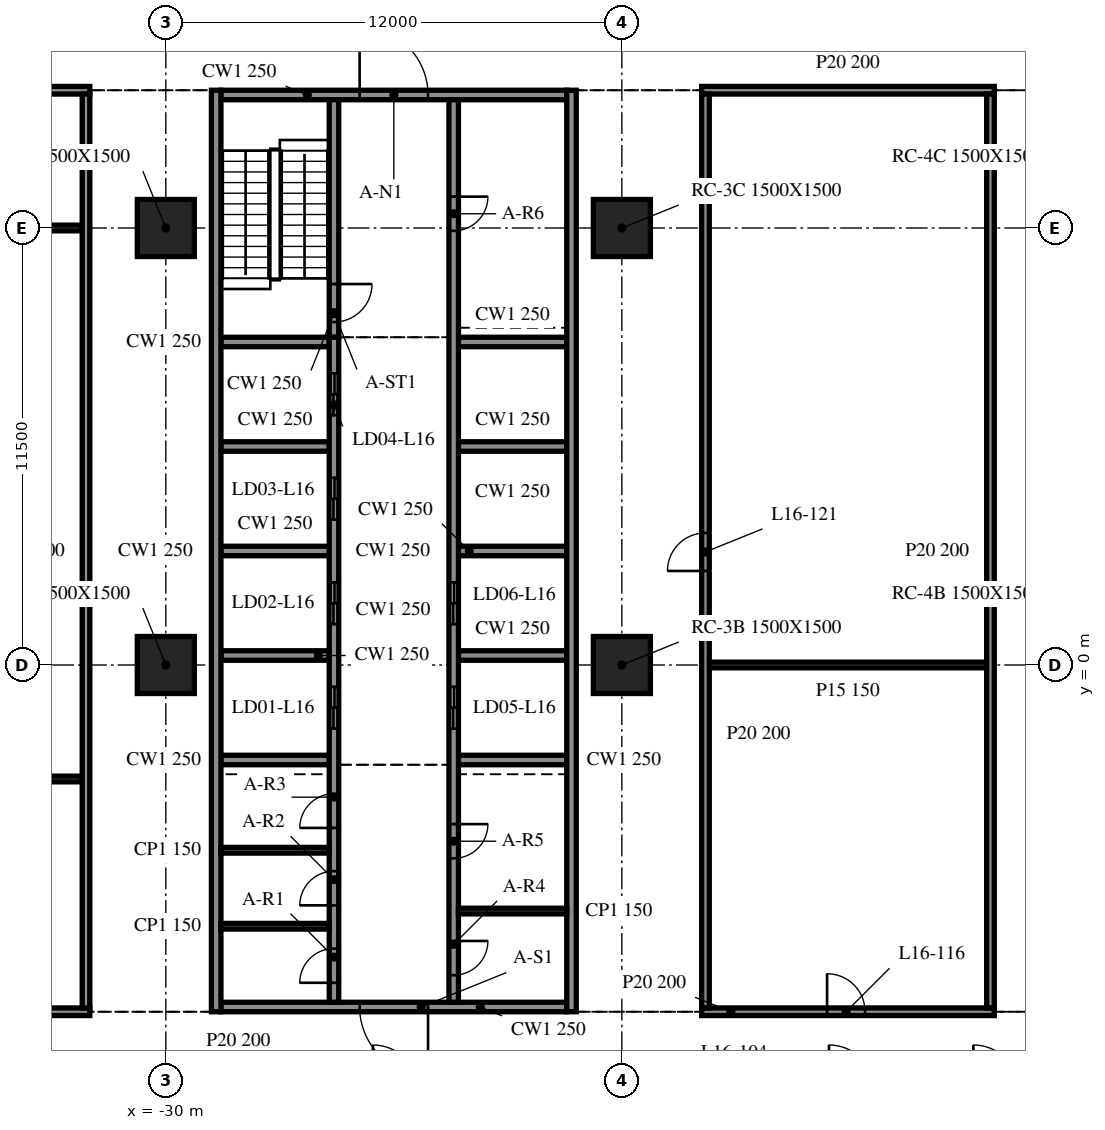
"""IFC4 building model, lengths in metres.
Left out: names, types, materials, properties, quantities, classifications, styles, units other than length and angle.
Written with IfcOpenShell. Run it as: python <this file> out.ifc"""

import sys

from ifc_helpers import new_model, si_unit, direction, frame, frame_2d, origin, origin_2d, place, context, subcontext, project, spatial, rectangle, extrude, element, fill, save


model = new_model("IFC4")
c1 = context("Model", 3, precision=1e-05, world=origin(), true_north=direction((0.0, 1.0)))
c2 = subcontext(c1, "Body", "Model", "MODEL_VIEW")
j1 = project(units=[si_unit("LENGTHUNIT", "METRE"), si_unit("PLANEANGLEUNIT", "RADIAN")], contexts=[c1])
p1 = place(None, origin())
s1 = spatial("IfcSite", under=j1, at=p1, CompositionType="ELEMENT")
p2 = place(p1, origin())
s2 = spatial("IfcBuilding", under=s1, at=p2, CompositionType="ELEMENT")
p3 = place(p2, frame((0.0, 0.0, 71.8)))
s3 = spatial("IfcBuildingStorey", under=s2, at=p3, CompositionType="ELEMENT", Elevation=71.8)
for number, where, z_axis, x_axis in (
    (1, (-30.0, 0.0, -0.34), (0.0, 0.0, 1.0), (1.0, 0.0, 0.0)),
    (2, (-30.0, 11.5, -0.34), (0.0, 0.0, 1.0), (1.0, 0.0, 0.0)),
    (3, (-18.0, 0.0, -0.34), (0.0, 0.0, 1.0), (1.0, 0.0, 0.0)),
    (4, (-18.0, 11.5, -0.34), (0.0, 0.0, 1.0), (1.0, 0.0, 0.0)),
):
    element("IfcColumn", number, at=place(p3, frame(where, z_axis=z_axis, x_axis=x_axis)), inside=s3, PredefinedType="COLUMN", context=c2, shape_type="SweptSolid", body=[
        extrude(rectangle(XDim=1.5, YDim=1.5, at=origin_2d()), origin(), (0.0, 0.0, 1.0), 4.3),
    ])
for number, where, z_axis, x_axis in (
    (5, (-28.675, 15.125, 0.0), (0.0, 0.0, 1.0), (0.0, -1.0, 0.0)),
    (6, (-19.325, -9.125, 0.0), (0.0, 0.0, 1.0), (0.0, 1.0, 0.0)),
):
    element("IfcWall", number, at=place(p3, frame(where, z_axis=z_axis, x_axis=x_axis)), inside=s3, PredefinedType="SOLIDWALL", context=c2, shape_type="SweptSolid", body=[
        extrude(rectangle(XDim=24.25, YDim=0.25, at=frame_2d((12.125, 0.0))), origin(), (0.0, 0.0, 1.0), 3.96),
    ])
p4 = place(p3, frame((-19.45, -9.0, 0.0), z_axis=(0.0, 0.0, 1.0), x_axis=(-1.0, 0.0, 0.0)))
e7 = element("IfcWall", 7, at=p4, inside=s3, PredefinedType="SOLIDWALL", context=c2, shape_type="SweptSolid", body=[
    extrude(rectangle(XDim=9.1, YDim=0.25, at=frame_2d((4.55, 0.0))), origin(), (0.0, 0.0, 1.0), 3.96),
])
p5 = place(p4, frame((3.65, 0.0, 0.0)))
e8 = element("IfcOpeningElement", 8, at=p5, cuts=e7, PredefinedType="OPENING", context=c2, shape_type="SweptSolid", body=[
    extrude(rectangle(XDim=1.8, YDim=2.1, at=frame_2d((0.9, 1.05))), frame((0.0, 0.135, 0.0), z_axis=(0.0, -1.0, 0.0), x_axis=(1.0, 0.0, 0.0)), (0.0, 0.0, 1.0), 0.27),
])
p6 = place(p3, frame((-28.55, 15.0, 0.0), z_axis=(0.0, 0.0, 1.0), x_axis=(1.0, 0.0, 0.0)))
e9 = element("IfcWall", 9, at=p6, inside=s3, PredefinedType="SOLIDWALL", context=c2, shape_type="SweptSolid", body=[
    extrude(rectangle(XDim=9.1, YDim=0.25, at=frame_2d((4.55, 0.0))), origin(), (0.0, 0.0, 1.0), 3.96),
])
p7 = place(p6, frame((3.65, 0.0, 0.0)))
e10 = element("IfcOpeningElement", 10, at=p7, cuts=e9, PredefinedType="OPENING", context=c2, shape_type="SweptSolid", body=[
    extrude(rectangle(XDim=1.8, YDim=2.1, at=frame_2d((0.9, 1.05))), frame((0.0, 0.135, 0.0), z_axis=(0.0, -1.0, 0.0), x_axis=(1.0, 0.0, 0.0)), (0.0, 0.0, 1.0), 0.27),
])
p8 = place(p3, frame((-25.575, -8.875, 0.0), z_axis=(0.0, 0.0, 1.0), x_axis=(0.0, 1.0, 0.0)))
e11 = element("IfcWall", 11, at=p8, inside=s3, PredefinedType="SOLIDWALL", context=c2, shape_type="SweptSolid", body=[
    extrude(rectangle(XDim=17.5, YDim=0.25, at=frame_2d((8.75, 0.0))), origin(), (0.0, 0.0, 1.0), 3.96),
])
p9 = place(p8, frame((7.2, 0.0, 0.0)))
e12 = element("IfcOpeningElement", 12, at=p9, cuts=e11, PredefinedType="OPENING", context=c2, shape_type="SweptSolid", body=[
    extrude(rectangle(XDim=1.1, YDim=2.1, at=frame_2d((0.55, 1.05))), frame((0.0, 0.135, 0.0), z_axis=(0.0, -1.0, 0.0), x_axis=(1.0, 0.0, 0.0)), (0.0, 0.0, 1.0), 0.27),
])
p10 = place(p8, frame((9.95, 0.0, 0.0)))
e13 = element("IfcOpeningElement", 13, at=p10, cuts=e11, PredefinedType="OPENING", context=c2, shape_type="SweptSolid", body=[
    extrude(rectangle(XDim=1.1, YDim=2.1, at=frame_2d((0.55, 1.05))), frame((0.0, 0.135, 0.0), z_axis=(0.0, -1.0, 0.0), x_axis=(1.0, 0.0, 0.0)), (0.0, 0.0, 1.0), 0.27),
])
p11 = place(p8, frame((12.7, 0.0, 0.0)))
e14 = element("IfcOpeningElement", 14, at=p11, cuts=e11, PredefinedType="OPENING", context=c2, shape_type="SweptSolid", body=[
    extrude(rectangle(XDim=1.1, YDim=2.1, at=frame_2d((0.55, 1.05))), frame((0.0, 0.135, 0.0), z_axis=(0.0, -1.0, 0.0), x_axis=(1.0, 0.0, 0.0)), (0.0, 0.0, 1.0), 0.27),
])
p12 = place(p8, frame((15.45, 0.0, 0.0)))
e15 = element("IfcOpeningElement", 15, at=p12, cuts=e11, PredefinedType="OPENING", context=c2, shape_type="SweptSolid", body=[
    extrude(rectangle(XDim=1.1, YDim=2.1, at=frame_2d((0.55, 1.05))), frame((0.0, 0.135, 0.0), z_axis=(0.0, -1.0, 0.0), x_axis=(1.0, 0.0, 0.0)), (0.0, 0.0, 1.0), 0.27),
])
p13 = place(p8, frame((0.512, 0.0, 0.0)))
e16 = element("IfcOpeningElement", 16, at=p13, cuts=e11, PredefinedType="OPENING", context=c2, shape_type="SweptSolid", body=[
    extrude(rectangle(XDim=0.9, YDim=2.1, at=frame_2d((0.45, 1.05))), frame((0.0, 0.135, 0.0), z_axis=(0.0, -1.0, 0.0), x_axis=(1.0, 0.0, 0.0)), (0.0, 0.0, 1.0), 0.27),
])
p14 = place(p8, frame((2.55, 0.0, 0.0)))
e17 = element("IfcOpeningElement", 17, at=p14, cuts=e11, PredefinedType="OPENING", context=c2, shape_type="SweptSolid", body=[
    extrude(rectangle(XDim=0.9, YDim=2.1, at=frame_2d((0.45, 1.05))), frame((0.0, 0.135, 0.0), z_axis=(0.0, -1.0, 0.0), x_axis=(1.0, 0.0, 0.0)), (0.0, 0.0, 1.0), 0.27),
])
p15 = place(p8, frame((4.587, 0.0, 0.0)))
e18 = element("IfcOpeningElement", 18, at=p15, cuts=e11, PredefinedType="OPENING", context=c2, shape_type="SweptSolid", body=[
    extrude(rectangle(XDim=0.9, YDim=2.1, at=frame_2d((0.45, 1.05))), frame((0.0, 0.135, 0.0), z_axis=(0.0, -1.0, 0.0), x_axis=(1.0, 0.0, 0.0)), (0.0, 0.0, 1.0), 0.27),
])
p16 = place(p3, frame((-25.575, 14.875, 0.0), z_axis=(0.0, 0.0, 1.0), x_axis=(0.0, -1.0, 0.0)))
e19 = element("IfcWall", 19, at=p16, inside=s3, PredefinedType="SOLIDWALL", context=c2, shape_type="SweptSolid", body=[
    extrude(rectangle(XDim=6.25, YDim=0.25, at=frame_2d((3.125, 0.0))), origin(), (0.0, 0.0, 1.0), 3.96),
])
p17 = place(p16, frame((4.85, 0.0, 0.0)))
e20 = element("IfcOpeningElement", 20, at=p17, cuts=e19, PredefinedType="OPENING", context=c2, shape_type="SweptSolid", body=[
    extrude(rectangle(XDim=1.0, YDim=2.1, at=frame_2d((0.5, 1.05))), frame((0.0, 0.135, 0.0), z_axis=(0.0, -1.0, 0.0), x_axis=(1.0, 0.0, 0.0)), (0.0, 0.0, 1.0), 0.27),
])
p18 = place(p3, frame((-22.425, 14.875, 0.0), z_axis=(0.0, 0.0, 1.0), x_axis=(0.0, -1.0, 0.0)))
e21 = element("IfcWall", 21, at=p18, inside=s3, PredefinedType="SOLIDWALL", context=c2, shape_type="SweptSolid", body=[
    extrude(rectangle(XDim=23.75, YDim=0.25, at=frame_2d((11.875, 0.0))), origin(), (0.0, 0.0, 1.0), 3.96),
])
p19 = place(p18, frame((15.45, 0.0, 0.0)))
e22 = element("IfcOpeningElement", 22, at=p19, cuts=e21, PredefinedType="OPENING", context=c2, shape_type="SweptSolid", body=[
    extrude(rectangle(XDim=1.1, YDim=2.1, at=frame_2d((0.55, 1.05))), frame((0.0, 0.135, 0.0), z_axis=(0.0, -1.0, 0.0), x_axis=(1.0, 0.0, 0.0)), (0.0, 0.0, 1.0), 0.27),
])
p20 = place(p18, frame((12.7, 0.0, 0.0)))
e23 = element("IfcOpeningElement", 23, at=p20, cuts=e21, PredefinedType="OPENING", context=c2, shape_type="SweptSolid", body=[
    extrude(rectangle(XDim=1.1, YDim=2.1, at=frame_2d((0.55, 1.05))), frame((0.0, 0.135, 0.0), z_axis=(0.0, -1.0, 0.0), x_axis=(1.0, 0.0, 0.0)), (0.0, 0.0, 1.0), 0.27),
])
p21 = place(p18, frame((22.137, 0.0, 0.0)))
e24 = element("IfcOpeningElement", 24, at=p21, cuts=e21, PredefinedType="OPENING", context=c2, shape_type="SweptSolid", body=[
    extrude(rectangle(XDim=0.9, YDim=2.1, at=frame_2d((0.45, 1.05))), frame((0.0, 0.135, 0.0), z_axis=(0.0, -1.0, 0.0), x_axis=(1.0, 0.0, 0.0)), (0.0, 0.0, 1.0), 0.27),
])
p22 = place(p18, frame((19.062, 0.0, 0.0)))
e25 = element("IfcOpeningElement", 25, at=p22, cuts=e21, PredefinedType="OPENING", context=c2, shape_type="SweptSolid", body=[
    extrude(rectangle(XDim=0.9, YDim=2.1, at=frame_2d((0.45, 1.05))), frame((0.0, 0.135, 0.0), z_axis=(0.0, -1.0, 0.0), x_axis=(1.0, 0.0, 0.0)), (0.0, 0.0, 1.0), 0.27),
])
p23 = place(p18, frame((2.55, 0.0, 0.0)))
e26 = element("IfcOpeningElement", 26, at=p23, cuts=e21, PredefinedType="OPENING", context=c2, shape_type="SweptSolid", body=[
    extrude(rectangle(XDim=0.9, YDim=2.1, at=frame_2d((0.45, 1.05))), frame((0.0, 0.135, 0.0), z_axis=(0.0, -1.0, 0.0), x_axis=(1.0, 0.0, 0.0)), (0.0, 0.0, 1.0), 0.27),
])
for number, where, z_axis, x_axis in (
    (27, (-28.55, -2.5, 0.0), (0.0, 0.0, 1.0), (1.0, 0.0, 0.0)),
    (28, (-28.55, 0.25, 0.0), (0.0, 0.0, 1.0), (1.0, 0.0, 0.0)),
    (29, (-28.55, 3.0, 0.0), (0.0, 0.0, 1.0), (1.0, 0.0, 0.0)),
    (30, (-28.55, 5.75, 0.0), (0.0, 0.0, 1.0), (1.0, 0.0, 0.0)),
    (31, (-28.55, 8.5, 0.0), (0.0, 0.0, 1.0), (1.0, 0.0, 0.0)),
    (32, (-22.3, -2.5, 0.0), (0.0, 0.0, 1.0), (1.0, 0.0, 0.0)),
    (33, (-22.3, 0.25, 0.0), (0.0, 0.0, 1.0), (1.0, 0.0, 0.0)),
    (34, (-22.3, 3.0, 0.0), (0.0, 0.0, 1.0), (1.0, 0.0, 0.0)),
    (35, (-22.3, 5.75, 0.0), (0.0, 0.0, 1.0), (1.0, 0.0, 0.0)),
    (36, (-22.3, 8.5, 0.0), (0.0, 0.0, 1.0), (1.0, 0.0, 0.0)),
):
    element("IfcWall", number, at=place(p3, frame(where, z_axis=z_axis, x_axis=x_axis)), inside=s3, PredefinedType="SOLIDWALL", context=c2, shape_type="SweptSolid", body=[
        extrude(rectangle(XDim=2.85, YDim=0.25, at=frame_2d((1.425, 0.0))), origin(), (0.0, 0.0, 1.0), 3.96),
    ])
for number, where, z_axis, x_axis in (
    (37, (-28.55, -6.875, 0.0), (0.0, 0.0, 1.0), (1.0, 0.0, 0.0)),
    (38, (-28.55, -4.875, 0.0), (0.0, 0.0, 1.0), (1.0, 0.0, 0.0)),
    (39, (-22.3, -6.475, 0.0), (0.0, 0.0, 1.0), (1.0, 0.0, 0.0)),
):
    element("IfcWall", number, at=place(p3, frame(where, z_axis=z_axis, x_axis=x_axis)), inside=s3, PredefinedType="PARTITIONING", context=c2, shape_type="SweptSolid", body=[
        extrude(rectangle(XDim=2.85, YDim=0.15, at=frame_2d((1.425, 0.0))), origin(), (0.0, 0.0, 1.0), 3.96),
    ])
p24 = place(p3, frame((-39.95, -9.125, 0.0), z_axis=(0.0, 0.0, 1.0), x_axis=(1.0, 0.0, 0.0)))
e40 = element("IfcWall", 40, at=p24, inside=s3, PredefinedType="PARTITIONING", context=c2, shape_type="SweptSolid", body=[
    extrude(rectangle(XDim=7.95, YDim=0.2, at=frame_2d((3.975, 0.0))), origin(), (0.0, 0.0, 1.0), 3.96),
])
p25 = place(p24, frame((3.3, 0.0, 0.0)))
e41 = element("IfcOpeningElement", 41, at=p25, cuts=e40, PredefinedType="OPENING", context=c2, shape_type="SweptSolid", body=[
    extrude(rectangle(XDim=1.2, YDim=2.1, at=frame_2d((0.6, 1.05))), frame((0.0, 0.11, 0.0), z_axis=(0.0, -1.0, 0.0), x_axis=(1.0, 0.0, 0.0)), (0.0, 0.0, 1.0), 0.22),
])
p26 = place(p3, frame((-15.9, -9.125, 0.0), z_axis=(0.0, 0.0, 1.0), x_axis=(1.0, 0.0, 0.0)))
e42 = element("IfcWall", 42, at=p26, inside=s3, PredefinedType="PARTITIONING", context=c2, shape_type="SweptSolid", body=[
    extrude(rectangle(XDim=7.7, YDim=0.2, at=frame_2d((3.85, 0.0))), origin(), (0.0, 0.0, 1.0), 3.96),
])
p27 = place(p26, frame((3.3, 0.0, 0.0)))
e43 = element("IfcOpeningElement", 43, at=p27, cuts=e42, PredefinedType="OPENING", context=c2, shape_type="SweptSolid", body=[
    extrude(rectangle(XDim=1.0, YDim=2.1, at=frame_2d((0.5, 1.05))), frame((0.0, 0.11, 0.0), z_axis=(0.0, -1.0, 0.0), x_axis=(1.0, 0.0, 0.0)), (0.0, 0.0, 1.0), 0.22),
])
p28 = place(p3, frame((-39.75, -3.0, 0.0), z_axis=(0.0, 0.0, 1.0), x_axis=(1.0, 0.0, 0.0)))
e44 = element("IfcWall", 44, at=p28, inside=s3, PredefinedType="PARTITIONING", context=c2, shape_type="SweptSolid", body=[
    extrude(rectangle(XDim=7.55, YDim=0.15, at=frame_2d((3.775, 0.0))), origin(), (0.0, 0.0, 1.0), 3.96),
])
p29 = place(p3, frame((-15.7, 0.0, 0.0), z_axis=(0.0, 0.0, 1.0), x_axis=(1.0, 0.0, 0.0)))
e45 = element("IfcWall", 45, at=p29, inside=s3, PredefinedType="PARTITIONING", context=c2, shape_type="SweptSolid", body=[
    extrude(rectangle(XDim=7.3, YDim=0.15, at=frame_2d((3.65, 0.0))), origin(), (0.0, 0.0, 1.0), 3.96),
])
p30 = place(p3, frame((-39.75, 11.5, 0.0), z_axis=(0.0, 0.0, 1.0), x_axis=(1.0, 0.0, 0.0)))
e46 = element("IfcWall", 46, at=p30, inside=s3, PredefinedType="PARTITIONING", context=c2, shape_type="SweptSolid", body=[
    extrude(rectangle(XDim=7.55, YDim=0.15, at=frame_2d((3.775, 0.0))), origin(), (0.0, 0.0, 1.0), 3.96),
])
p31 = place(p3, frame((-39.95, 15.125, 0.0), z_axis=(0.0, 0.0, 1.0), x_axis=(1.0, 0.0, 0.0)))
e47 = element("IfcWall", 47, at=p31, inside=s3, PredefinedType="PARTITIONING", context=c2, shape_type="SweptSolid", body=[
    extrude(rectangle(XDim=7.95, YDim=0.2, at=frame_2d((3.975, 0.0))), origin(), (0.0, 0.0, 1.0), 3.96),
])
p32 = place(p31, frame((3.5, 0.0, 0.0)))
e48 = element("IfcOpeningElement", 48, at=p32, cuts=e47, PredefinedType="OPENING", context=c2, shape_type="SweptSolid", body=[
    extrude(rectangle(XDim=1.0, YDim=2.1, at=frame_2d((0.5, 1.05))), frame((0.0, 0.11, 0.0), z_axis=(0.0, -1.0, 0.0), x_axis=(1.0, 0.0, 0.0)), (0.0, 0.0, 1.0), 0.22),
])
p33 = place(p3, frame((-15.9, 15.125, 0.0), z_axis=(0.0, 0.0, 1.0), x_axis=(1.0, 0.0, 0.0)))
e49 = element("IfcWall", 49, at=p33, inside=s3, PredefinedType="PARTITIONING", context=c2, shape_type="SweptSolid", body=[
    extrude(rectangle(XDim=7.7, YDim=0.2, at=frame_2d((3.85, 0.0))), origin(), (0.0, 0.0, 1.0), 3.96),
])
p34 = place(p3, frame((-32.1, -9.025, 0.0), z_axis=(0.0, 0.0, 1.0), x_axis=(0.0, 1.0, 0.0)))
e50 = element("IfcWall", 50, at=p34, inside=s3, PredefinedType="PARTITIONING", context=c2, shape_type="SweptSolid", body=[
    extrude(rectangle(XDim=24.05, YDim=0.2, at=frame_2d((12.025, 0.0))), origin(), (0.0, 0.0, 1.0), 3.96),
])
p35 = place(p3, frame((-15.8, -9.025, 0.0), z_axis=(0.0, 0.0, 1.0), x_axis=(0.0, 1.0, 0.0)))
e51 = element("IfcWall", 51, at=p35, inside=s3, PredefinedType="PARTITIONING", context=c2, shape_type="SweptSolid", body=[
    extrude(rectangle(XDim=24.05, YDim=0.2, at=frame_2d((12.025, 0.0))), origin(), (0.0, 0.0, 1.0), 3.96),
])
p36 = place(p35, frame((11.5, 0.0, 0.0)))
e52 = element("IfcOpeningElement", 52, at=p36, cuts=e51, PredefinedType="OPENING", context=c2, shape_type="SweptSolid", body=[
    extrude(rectangle(XDim=1.0, YDim=2.1, at=frame_2d((0.5, 1.05))), frame((0.0, 0.11, 0.0), z_axis=(0.0, -1.0, 0.0), x_axis=(1.0, 0.0, 0.0)), (0.0, 0.0, 1.0), 0.22),
])
p37 = place(p3, frame((-8.3, -9.025, 0.0), z_axis=(0.0, 0.0, 1.0), x_axis=(0.0, 1.0, 0.0)))
e53 = element("IfcWall", 53, at=p37, inside=s3, PredefinedType="PARTITIONING", context=c2, shape_type="SweptSolid", body=[
    extrude(rectangle(XDim=24.05, YDim=0.2, at=frame_2d((12.025, 0.0))), origin(), (0.0, 0.0, 1.0), 3.96),
])
p38 = place(p5, origin())
e54 = element("IfcDoor", 54, at=p38, inside=s3, OperationType="DOUBLE_DOOR_SINGLE_SWING", PredefinedType="DOOR", context=c2, shape_type="SweptSolid", body=[
    extrude(rectangle(XDim=1.8, YDim=2.1, at=frame_2d((0.9, 1.05))), frame((0.0, 0.025, 0.0), z_axis=(0.0, -1.0, 0.0), x_axis=(1.0, 0.0, 0.0)), (0.0, 0.0, 1.0), 0.05),
])
fill(e8, e54)
p39 = place(p7, origin())
e55 = element("IfcDoor", 55, at=p39, inside=s3, OperationType="DOUBLE_DOOR_SINGLE_SWING", PredefinedType="DOOR", context=c2, shape_type="SweptSolid", body=[
    extrude(rectangle(XDim=1.8, YDim=2.1, at=frame_2d((0.9, 1.05))), frame((0.0, 0.025, 0.0), z_axis=(0.0, -1.0, 0.0), x_axis=(1.0, 0.0, 0.0)), (0.0, 0.0, 1.0), 0.05),
])
fill(e10, e55)
p40 = place(p19, origin())
e56 = element("IfcDoor", 56, at=p40, inside=s3, OperationType="DOUBLE_DOOR_SLIDING", PredefinedType="DOOR", context=c2, shape_type="SweptSolid", body=[
    extrude(rectangle(XDim=1.1, YDim=2.1, at=frame_2d((0.55, 1.05))), frame((0.0, 0.025, 0.0), z_axis=(0.0, -1.0, 0.0), x_axis=(1.0, 0.0, 0.0)), (0.0, 0.0, 1.0), 0.05),
])
fill(e22, e56)
p41 = place(p20, origin())
e57 = element("IfcDoor", 57, at=p41, inside=s3, OperationType="DOUBLE_DOOR_SLIDING", PredefinedType="DOOR", context=c2, shape_type="SweptSolid", body=[
    extrude(rectangle(XDim=1.1, YDim=2.1, at=frame_2d((0.55, 1.05))), frame((0.0, 0.025, 0.0), z_axis=(0.0, -1.0, 0.0), x_axis=(1.0, 0.0, 0.0)), (0.0, 0.0, 1.0), 0.05),
])
fill(e23, e57)
p42 = place(p9, origin())
e58 = element("IfcDoor", 58, at=p42, inside=s3, OperationType="DOUBLE_DOOR_SLIDING", PredefinedType="DOOR", context=c2, shape_type="SweptSolid", body=[
    extrude(rectangle(XDim=1.1, YDim=2.1, at=frame_2d((0.55, 1.05))), frame((0.0, 0.025, 0.0), z_axis=(0.0, -1.0, 0.0), x_axis=(1.0, 0.0, 0.0)), (0.0, 0.0, 1.0), 0.05),
])
fill(e12, e58)
p43 = place(p10, origin())
e59 = element("IfcDoor", 59, at=p43, inside=s3, OperationType="DOUBLE_DOOR_SLIDING", PredefinedType="DOOR", context=c2, shape_type="SweptSolid", body=[
    extrude(rectangle(XDim=1.1, YDim=2.1, at=frame_2d((0.55, 1.05))), frame((0.0, 0.025, 0.0), z_axis=(0.0, -1.0, 0.0), x_axis=(1.0, 0.0, 0.0)), (0.0, 0.0, 1.0), 0.05),
])
fill(e13, e59)
p44 = place(p11, origin())
e60 = element("IfcDoor", 60, at=p44, inside=s3, OperationType="DOUBLE_DOOR_SLIDING", PredefinedType="DOOR", context=c2, shape_type="SweptSolid", body=[
    extrude(rectangle(XDim=1.1, YDim=2.1, at=frame_2d((0.55, 1.05))), frame((0.0, 0.025, 0.0), z_axis=(0.0, -1.0, 0.0), x_axis=(1.0, 0.0, 0.0)), (0.0, 0.0, 1.0), 0.05),
])
fill(e14, e60)
p45 = place(p12, origin())
e61 = element("IfcDoor", 61, at=p45, inside=s3, OperationType="DOUBLE_DOOR_SLIDING", PredefinedType="DOOR", context=c2, shape_type="SweptSolid", body=[
    extrude(rectangle(XDim=1.1, YDim=2.1, at=frame_2d((0.55, 1.05))), frame((0.0, 0.025, 0.0), z_axis=(0.0, -1.0, 0.0), x_axis=(1.0, 0.0, 0.0)), (0.0, 0.0, 1.0), 0.05),
])
fill(e15, e61)
p46 = place(p13, origin())
e62 = element("IfcDoor", 62, at=p46, inside=s3, OperationType="SINGLE_SWING_LEFT", PredefinedType="DOOR", context=c2, shape_type="SweptSolid", body=[
    extrude(rectangle(XDim=0.9, YDim=2.1, at=frame_2d((0.45, 1.05))), frame((0.0, 0.025, 0.0), z_axis=(0.0, -1.0, 0.0), x_axis=(1.0, 0.0, 0.0)), (0.0, 0.0, 1.0), 0.05),
])
fill(e16, e62)
p47 = place(p14, origin())
e63 = element("IfcDoor", 63, at=p47, inside=s3, OperationType="SINGLE_SWING_RIGHT", PredefinedType="DOOR", context=c2, shape_type="SweptSolid", body=[
    extrude(rectangle(XDim=0.9, YDim=2.1, at=frame_2d((0.45, 1.05))), frame((0.0, 0.025, 0.0), z_axis=(0.0, -1.0, 0.0), x_axis=(1.0, 0.0, 0.0)), (0.0, 0.0, 1.0), 0.05),
])
fill(e17, e63)
p48 = place(p15, origin())
e64 = element("IfcDoor", 64, at=p48, inside=s3, OperationType="SINGLE_SWING_LEFT", PredefinedType="DOOR", context=c2, shape_type="SweptSolid", body=[
    extrude(rectangle(XDim=0.9, YDim=2.1, at=frame_2d((0.45, 1.05))), frame((0.0, 0.025, 0.0), z_axis=(0.0, -1.0, 0.0), x_axis=(1.0, 0.0, 0.0)), (0.0, 0.0, 1.0), 0.05),
])
fill(e18, e64)
p49 = place(p21, origin())
e65 = element("IfcDoor", 65, at=p49, inside=s3, OperationType="SINGLE_SWING_RIGHT", PredefinedType="DOOR", context=c2, shape_type="SweptSolid", body=[
    extrude(rectangle(XDim=0.9, YDim=2.1, at=frame_2d((0.45, 1.05))), frame((0.0, 0.025, 0.0), z_axis=(0.0, -1.0, 0.0), x_axis=(1.0, 0.0, 0.0)), (0.0, 0.0, 1.0), 0.05),
])
fill(e24, e65)
p50 = place(p22, origin())
e66 = element("IfcDoor", 66, at=p50, inside=s3, OperationType="SINGLE_SWING_LEFT", PredefinedType="DOOR", context=c2, shape_type="SweptSolid", body=[
    extrude(rectangle(XDim=0.9, YDim=2.1, at=frame_2d((0.45, 1.05))), frame((0.0, 0.025, 0.0), z_axis=(0.0, -1.0, 0.0), x_axis=(1.0, 0.0, 0.0)), (0.0, 0.0, 1.0), 0.05),
])
fill(e25, e66)
p51 = place(p23, origin())
e67 = element("IfcDoor", 67, at=p51, inside=s3, OperationType="SINGLE_SWING_RIGHT", PredefinedType="DOOR", context=c2, shape_type="SweptSolid", body=[
    extrude(rectangle(XDim=0.9, YDim=2.1, at=frame_2d((0.45, 1.05))), frame((0.0, 0.025, 0.0), z_axis=(0.0, -1.0, 0.0), x_axis=(1.0, 0.0, 0.0)), (0.0, 0.0, 1.0), 0.05),
])
fill(e26, e67)
p52 = place(p17, origin())
e68 = element("IfcDoor", 68, at=p52, inside=s3, OperationType="SINGLE_SWING_LEFT", PredefinedType="DOOR", context=c2, shape_type="SweptSolid", body=[
    extrude(rectangle(XDim=1.0, YDim=2.1, at=frame_2d((0.5, 1.05))), frame((0.0, 0.025, 0.0), z_axis=(0.0, -1.0, 0.0), x_axis=(1.0, 0.0, 0.0)), (0.0, 0.0, 1.0), 0.05),
])
fill(e20, e68)
p53 = place(p27, origin())
e69 = element("IfcDoor", 69, at=p53, inside=s3, OperationType="SINGLE_SWING_LEFT", PredefinedType="DOOR", context=c2, shape_type="SweptSolid", body=[
    extrude(rectangle(XDim=1.0, YDim=2.1, at=frame_2d((0.5, 1.05))), frame((0.0, 0.025, 0.0), z_axis=(0.0, -1.0, 0.0), x_axis=(1.0, 0.0, 0.0)), (0.0, 0.0, 1.0), 0.05),
])
fill(e43, e69)
p54 = place(p36, origin())
e70 = element("IfcDoor", 70, at=p54, inside=s3, OperationType="SINGLE_SWING_RIGHT", PredefinedType="DOOR", context=c2, shape_type="SweptSolid", body=[
    extrude(rectangle(XDim=1.0, YDim=2.1, at=frame_2d((0.5, 1.05))), frame((0.0, 0.025, 0.0), z_axis=(0.0, -1.0, 0.0), x_axis=(1.0, 0.0, 0.0)), (0.0, 0.0, 1.0), 0.05),
])
fill(e52, e70)
save(model, sys.argv[1])
